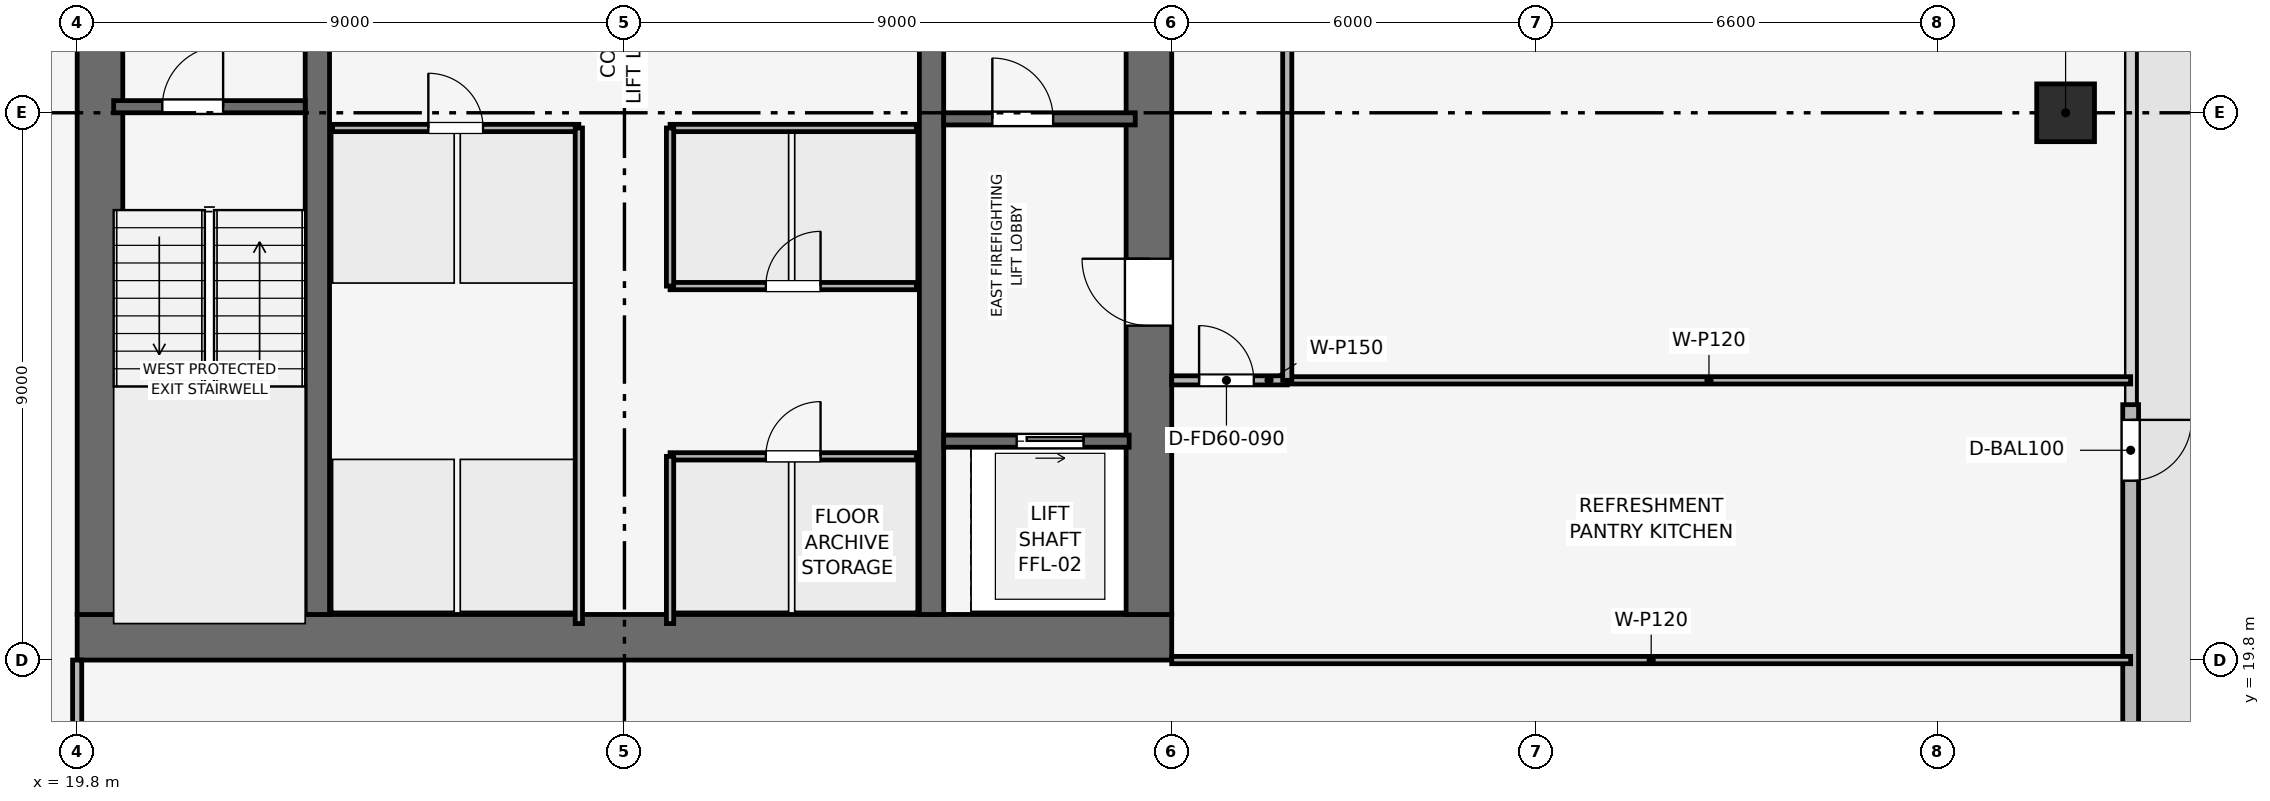
"""IFC4 building model, lengths in metres.
Left out: names, types, materials, properties, quantities, classifications, styles, units other than length and angle.
Written with IfcOpenShell. Run it as: python <this file> out.ifc"""

import sys

from ifc_helpers import new_model, si_unit, direction, frame, frame_2d, origin, origin_2d, place, context, subcontext, project, spatial, rectangle, extrude, element, fill, save


model = new_model("IFC4")
c1 = context("Model", 3, precision=1e-05, world=origin(), true_north=direction((0.0, 1.0)))
c2 = subcontext(c1, "Body", "Model", "MODEL_VIEW")
j1 = project(units=[si_unit("LENGTHUNIT", "METRE"), si_unit("PLANEANGLEUNIT", "RADIAN")], contexts=[c1])
p1 = place(None, origin())
s1 = spatial("IfcSite", under=j1, at=p1, CompositionType="ELEMENT")
p2 = place(p1, origin())
s2 = spatial("IfcBuilding", under=s1, at=p2, CompositionType="ELEMENT")
p3 = place(p2, frame((0.0, 0.0, 276.6)))
s3 = spatial("IfcBuildingStorey", under=s2, at=p3, CompositionType="ELEMENT", Elevation=276.6)
p4 = place(p3, frame((19.8, 20.175, 0.0), z_axis=(0.0, 0.0, 1.0), x_axis=(1.0, 0.0, 0.0)))
e1 = element("IfcWall", 1, at=p4, inside=s3, PredefinedType="SHEAR", context=c2, shape_type="SweptSolid", body=[
    extrude(rectangle(XDim=18.0, YDim=0.75, at=frame_2d((9.0, 0.0))), origin(), (0.0, 0.0, 1.0), 3.75),
])
p5 = place(p3, frame((20.175, 20.55, 0.0), z_axis=(0.0, 0.0, 1.0), x_axis=(0.0, 1.0, 0.0)))
e2 = element("IfcWall", 2, at=p5, inside=s3, PredefinedType="SHEAR", context=c2, shape_type="SweptSolid", body=[
    extrude(rectangle(XDim=16.5, YDim=0.75, at=frame_2d((8.25, 0.0))), origin(), (0.0, 0.0, 1.0), 3.75),
])
p6 = place(p5, frame((10.25, 0.0, 0.0)))
e3 = element("IfcOpeningElement", 3, at=p6, cuts=e2, PredefinedType="OPENING", context=c2, shape_type="SweptSolid", body=[
    extrude(rectangle(XDim=1.1, YDim=2.15, at=frame_2d((0.55, 1.075))), frame((0.0, 0.385, 0.0), z_axis=(0.0, -1.0, 0.0), x_axis=(1.0, 0.0, 0.0)), (0.0, 0.0, 1.0), 0.77),
])
p7 = place(p3, frame((37.425, 20.55, 0.0), z_axis=(0.0, 0.0, 1.0), x_axis=(0.0, 1.0, 0.0)))
e4 = element("IfcWall", 4, at=p7, inside=s3, PredefinedType="SHEAR", context=c2, shape_type="SweptSolid", body=[
    extrude(rectangle(XDim=16.5, YDim=0.75, at=frame_2d((8.25, 0.0))), origin(), (0.0, 0.0, 1.0), 3.75),
])
p8 = place(p7, frame((4.75, 0.0, 0.0)))
e5 = element("IfcOpeningElement", 5, at=p8, cuts=e4, PredefinedType="OPENING", context=c2, shape_type="SweptSolid", body=[
    extrude(rectangle(XDim=1.1, YDim=2.15, at=frame_2d((0.55, 1.075))), frame((0.0, 0.385, 0.0), z_axis=(0.0, -1.0, 0.0), x_axis=(1.0, 0.0, 0.0)), (0.0, 0.0, 1.0), 0.77),
])
for number, where, z_axis, x_axis in (
    (6, (23.75, 20.55, 0.0), (0.0, 0.0, 1.0), (0.0, 1.0, 0.0)),
    (7, (33.85, 20.55, 0.0), (0.0, 0.0, 1.0), (0.0, 1.0, 0.0)),
):
    element("IfcWall", number, at=place(p3, frame(where, z_axis=z_axis, x_axis=x_axis)), inside=s3, PredefinedType="SHEAR", context=c2, shape_type="SweptSolid", body=[
        extrude(rectangle(XDim=16.5, YDim=0.4, at=frame_2d((8.25, 0.0))), origin(), (0.0, 0.0, 1.0), 3.75),
    ])
p9 = place(p3, frame((52.5, 28.8, 0.003), z_axis=(0.0, 0.0, 1.0), x_axis=(1.0, 0.0, 0.0)))
e8 = element("IfcColumn", 8, at=p9, inside=s3, PredefinedType="COLUMN", context=c2, shape_type="SweptSolid", body=[
    extrude(rectangle(XDim=0.95, YDim=0.95, at=origin_2d()), origin(), (0.0, 0.0, 1.0), 3.494),
])
p10 = place(p3, frame((53.57, 24.0, 0.0), z_axis=(0.0, 0.0, 1.0), x_axis=(0.0, -1.0, 0.0)))
e9 = element("IfcWall", 9, at=p10, inside=s3, PredefinedType="SOLIDWALL", context=c2, shape_type="SweptSolid", body=[
    extrude(rectangle(XDim=13.2, YDim=0.26, at=frame_2d((6.6, 0.0))), origin(), (0.0, 0.0, 1.0), 3.5),
])
p11 = place(p10, frame((0.25, 0.0, 0.0)))
e10 = element("IfcOpeningElement", 10, at=p11, cuts=e9, PredefinedType="OPENING", context=c2, shape_type="SweptSolid", body=[
    extrude(rectangle(XDim=1.0, YDim=2.2, at=frame_2d((0.5, 1.1))), frame((0.0, 0.14, 0.0), z_axis=(0.0, -1.0, 0.0), x_axis=(1.0, 0.0, 0.0)), (0.0, 0.0, 1.0), 0.28),
])
p12 = place(p3, frame((20.4, 28.9, 0.0), z_axis=(0.0, 0.0, 1.0), x_axis=(1.0, 0.0, 0.0)))
e11 = element("IfcWall", 11, at=p12, inside=s3, PredefinedType="SHEAR", context=c2, shape_type="SweptSolid", body=[
    extrude(rectangle(XDim=3.15, YDim=0.2, at=frame_2d((1.575, 0.0))), origin(), (0.0, 0.0, 1.0), 3.5),
])
p13 = place(p12, frame((0.8, 0.0, 0.0)))
e12 = element("IfcOpeningElement", 12, at=p13, cuts=e11, PredefinedType="OPENING", context=c2, shape_type="SweptSolid", body=[
    extrude(rectangle(XDim=1.0, YDim=2.1, at=frame_2d((0.5, 1.05))), frame((0.0, 0.11, 0.0), z_axis=(0.0, -1.0, 0.0), x_axis=(1.0, 0.0, 0.0)), (0.0, 0.0, 1.0), 0.22),
])
p14 = place(p3, frame((34.05, 28.7, 0.0), z_axis=(0.0, 0.0, 1.0), x_axis=(1.0, 0.0, 0.0)))
e13 = element("IfcWall", 13, at=p14, inside=s3, PredefinedType="SHEAR", context=c2, shape_type="SweptSolid", body=[
    extrude(rectangle(XDim=3.15, YDim=0.2, at=frame_2d((1.575, 0.0))), origin(), (0.0, 0.0, 1.0), 3.5),
])
p15 = place(p14, frame((0.8, 0.0, 0.0)))
e14 = element("IfcOpeningElement", 14, at=p15, cuts=e13, PredefinedType="OPENING", context=c2, shape_type="SweptSolid", body=[
    extrude(rectangle(XDim=1.0, YDim=2.1, at=frame_2d((0.5, 1.05))), frame((0.0, 0.11, 0.0), z_axis=(0.0, -1.0, 0.0), x_axis=(1.0, 0.0, 0.0)), (0.0, 0.0, 1.0), 0.22),
])
p16 = place(p3, frame((34.05, 23.4, 0.0), z_axis=(0.0, 0.0, 1.0), x_axis=(1.0, 0.0, 0.0)))
e15 = element("IfcWall", 15, at=p16, inside=s3, PredefinedType="SHEAR", context=c2, shape_type="SweptSolid", body=[
    extrude(rectangle(XDim=3.05, YDim=0.2, at=frame_2d((1.525, 0.0))), origin(), (0.0, 0.0, 1.0), 3.5),
])
p17 = place(p16, frame((1.2, 0.0, 0.0)))
e16 = element("IfcOpeningElement", 16, at=p17, cuts=e15, PredefinedType="OPENING", context=c2, shape_type="SweptSolid", body=[
    extrude(rectangle(XDim=1.1, YDim=2.15, at=frame_2d((0.55, 1.075))), frame((0.0, 0.11, 0.0), z_axis=(0.0, -1.0, 0.0), x_axis=(1.0, 0.0, 0.0)), (0.0, 0.0, 1.0), 0.22),
])
p18 = place(p3, frame((24.0, 28.55, 0.0), z_axis=(0.0, 0.0, 1.0), x_axis=(1.0, 0.0, 0.0)))
e17 = element("IfcWall", 17, at=p18, inside=s3, PredefinedType="PARTITIONING", context=c2, shape_type="SweptSolid", body=[
    extrude(rectangle(XDim=4.05, YDim=0.12, at=frame_2d((2.025, 0.0))), origin(), (0.0, 0.0, 1.0), 3.5),
])
p19 = place(p18, frame((1.575, 0.0, 0.0)))
e18 = element("IfcOpeningElement", 18, at=p19, cuts=e17, PredefinedType="OPENING", context=c2, shape_type="SweptSolid", body=[
    extrude(rectangle(XDim=0.9, YDim=2.1, at=frame_2d((0.45, 1.05))), frame((0.0, 0.07, 0.0), z_axis=(0.0, -1.0, 0.0), x_axis=(1.0, 0.0, 0.0)), (0.0, 0.0, 1.0), 0.14),
])
p20 = place(p3, frame((28.05, 20.4, 0.0), z_axis=(0.0, 0.0, 1.0), x_axis=(0.0, 1.0, 0.0)))
e19 = element("IfcWall", 19, at=p20, inside=s3, PredefinedType="PARTITIONING", context=c2, shape_type="SweptSolid", body=[
    extrude(rectangle(XDim=8.15, YDim=0.12, at=frame_2d((4.075, 0.0))), origin(), (0.0, 0.0, 1.0), 3.5),
])
p21 = place(p3, frame((29.55, 23.15, 0.0), z_axis=(0.0, 0.0, 1.0), x_axis=(1.0, 0.0, 0.0)))
e20 = element("IfcWall", 20, at=p21, inside=s3, PredefinedType="PARTITIONING", context=c2, shape_type="SweptSolid", body=[
    extrude(rectangle(XDim=4.05, YDim=0.12, at=frame_2d((2.025, 0.0))), origin(), (0.0, 0.0, 1.0), 3.5),
])
p22 = place(p21, frame((1.575, 0.0, 0.0)))
e21 = element("IfcOpeningElement", 21, at=p22, cuts=e20, PredefinedType="OPENING", context=c2, shape_type="SweptSolid", body=[
    extrude(rectangle(XDim=0.9, YDim=2.1, at=frame_2d((0.45, 1.05))), frame((0.0, 0.07, 0.0), z_axis=(0.0, -1.0, 0.0), x_axis=(1.0, 0.0, 0.0)), (0.0, 0.0, 1.0), 0.14),
])
p23 = place(p3, frame((29.55, 20.4, 0.0), z_axis=(0.0, 0.0, 1.0), x_axis=(0.0, 1.0, 0.0)))
e22 = element("IfcWall", 22, at=p23, inside=s3, PredefinedType="PARTITIONING", context=c2, shape_type="SweptSolid", body=[
    extrude(rectangle(XDim=2.75, YDim=0.12, at=frame_2d((1.375, 0.0))), origin(), (0.0, 0.0, 1.0), 3.5),
])
p24 = place(p3, frame((29.55, 25.95, 0.0), z_axis=(0.0, 0.0, 1.0), x_axis=(1.0, 0.0, 0.0)))
e23 = element("IfcWall", 23, at=p24, inside=s3, PredefinedType="PARTITIONING", context=c2, shape_type="SweptSolid", body=[
    extrude(rectangle(XDim=4.05, YDim=0.12, at=frame_2d((2.025, 0.0))), origin(), (0.0, 0.0, 1.0), 3.5),
])
p25 = place(p24, frame((1.575, 0.0, 0.0)))
e24 = element("IfcOpeningElement", 24, at=p25, cuts=e23, PredefinedType="OPENING", context=c2, shape_type="SweptSolid", body=[
    extrude(rectangle(XDim=0.9, YDim=2.1, at=frame_2d((0.45, 1.05))), frame((0.0, 0.07, 0.0), z_axis=(0.0, -1.0, 0.0), x_axis=(1.0, 0.0, 0.0)), (0.0, 0.0, 1.0), 0.14),
])
p26 = place(p3, frame((29.55, 28.55, 0.0), z_axis=(0.0, 0.0, 1.0), x_axis=(1.0, 0.0, 0.0)))
e25 = element("IfcWall", 25, at=p26, inside=s3, PredefinedType="PARTITIONING", context=c2, shape_type="SweptSolid", body=[
    extrude(rectangle(XDim=4.05, YDim=0.12, at=frame_2d((2.025, 0.0))), origin(), (0.0, 0.0, 1.0), 3.5),
])
p27 = place(p3, frame((29.55, 25.95, 0.0), z_axis=(0.0, 0.0, 1.0), x_axis=(0.0, 1.0, 0.0)))
e26 = element("IfcWall", 26, at=p27, inside=s3, PredefinedType="PARTITIONING", context=c2, shape_type="SweptSolid", body=[
    extrude(rectangle(XDim=2.6, YDim=0.12, at=frame_2d((1.3, 0.0))), origin(), (0.0, 0.0, 1.0), 3.5),
])
p28 = place(p3, frame((19.8, 4.03, 0.0), z_axis=(0.0, 0.0, 1.0), x_axis=(0.0, 1.0, 0.0)))
e27 = element("IfcWall", 27, at=p28, inside=s3, PredefinedType="PARTITIONING", context=c2, shape_type="SweptSolid", body=[
    extrude(rectangle(XDim=15.77, YDim=0.15, at=frame_2d((7.885, 0.0))), origin(), (0.0, 0.0, 1.0), 3.085),
])
p29 = place(p28, frame((10.82, 0.0, 0.0)))
e28 = element("IfcOpeningElement", 28, at=p29, cuts=e27, PredefinedType="OPENING", context=c2, shape_type="SweptSolid", body=[
    extrude(rectangle(XDim=0.9, YDim=2.1, at=frame_2d((0.45, 1.05))), frame((0.0, 0.085, 0.0), z_axis=(0.0, -1.0, 0.0), x_axis=(1.0, 0.0, 0.0)), (0.0, 0.0, 1.0), 0.17),
])
p30 = place(p3, frame((37.8, 19.8, 0.0), z_axis=(0.0, 0.0, 1.0), x_axis=(1.0, 0.0, 0.0)))
e29 = element("IfcWall", 29, at=p30, inside=s3, PredefinedType="PARTITIONING", context=c2, shape_type="SweptSolid", body=[
    extrude(rectangle(XDim=15.77, YDim=0.12, at=frame_2d((7.885, 0.0))), origin(), (0.0, 0.0, 1.0), 3.085),
])
p31 = place(p3, frame((37.8, 24.4, 0.0), z_axis=(0.0, 0.0, 1.0), x_axis=(1.0, 0.0, 0.0)))
e30 = element("IfcWall", 30, at=p31, inside=s3, PredefinedType="PARTITIONING", context=c2, shape_type="SweptSolid", body=[
    extrude(rectangle(XDim=1.9, YDim=0.15, at=frame_2d((0.95, 0.0))), origin(), (0.0, 0.0, 1.0), 3.5),
])
p32 = place(p31, frame((0.45, 0.0, 0.0)))
e31 = element("IfcOpeningElement", 31, at=p32, cuts=e30, PredefinedType="OPENING", context=c2, shape_type="SweptSolid", body=[
    extrude(rectangle(XDim=0.9, YDim=2.1, at=frame_2d((0.45, 1.05))), frame((0.0, 0.085, 0.0), z_axis=(0.0, -1.0, 0.0), x_axis=(1.0, 0.0, 0.0)), (0.0, 0.0, 1.0), 0.17),
])
p33 = place(p3, frame((39.7, 24.4, 0.0), z_axis=(0.0, 0.0, 1.0), x_axis=(1.0, 0.0, 0.0)))
e32 = element("IfcWall", 32, at=p33, inside=s3, PredefinedType="PARTITIONING", context=c2, shape_type="SweptSolid", body=[
    extrude(rectangle(XDim=13.87, YDim=0.12, at=frame_2d((6.935, 0.0))), origin(), (0.0, 0.0, 1.0), 3.085),
])
p34 = place(p3, frame((39.7, 24.4, 0.0), z_axis=(0.0, 0.0, 1.0), x_axis=(0.0, 1.0, 0.0)))
e33 = element("IfcWall", 33, at=p34, inside=s3, PredefinedType="PARTITIONING", context=c2, shape_type="SweptSolid", body=[
    extrude(rectangle(XDim=15.3, YDim=0.15, at=frame_2d((7.65, 0.0))), origin(), (0.0, 0.0, 1.0), 3.085),
])
p35 = place(p34, frame((7.2, 0.0, 0.0)))
e34 = element("IfcOpeningElement", 34, at=p35, cuts=e33, PredefinedType="OPENING", context=c2, shape_type="SweptSolid", body=[
    extrude(rectangle(XDim=0.9, YDim=2.1, at=frame_2d((0.45, 1.05))), frame((0.0, 0.085, 0.0), z_axis=(0.0, -1.0, 0.0), x_axis=(1.0, 0.0, 0.0)), (0.0, 0.0, 1.0), 0.17),
])
p36 = place(p11, origin())
e35 = element("IfcDoor", 35, at=p36, inside=s3, OperationType="SINGLE_SWING_LEFT", PredefinedType="DOOR", context=c2, shape_type="SweptSolid", body=[
    extrude(rectangle(XDim=1.0, YDim=2.2, at=frame_2d((0.5, 1.1))), frame((0.0, 0.025, 0.0), z_axis=(0.0, -1.0, 0.0), x_axis=(1.0, 0.0, 0.0)), (0.0, 0.0, 1.0), 0.05),
])
fill(e10, e35)
p37 = place(p13, origin())
e36 = element("IfcDoor", 36, at=p37, inside=s3, OperationType="SINGLE_SWING_RIGHT", PredefinedType="DOOR", context=c2, shape_type="SweptSolid", body=[
    extrude(rectangle(XDim=1.0, YDim=2.1, at=frame_2d((0.5, 1.05))), frame((0.0, 0.025, 0.0), z_axis=(0.0, -1.0, 0.0), x_axis=(1.0, 0.0, 0.0)), (0.0, 0.0, 1.0), 0.05),
])
fill(e12, e36)
p38 = place(p15, origin())
e37 = element("IfcDoor", 37, at=p38, inside=s3, OperationType="SINGLE_SWING_LEFT", PredefinedType="DOOR", context=c2, shape_type="SweptSolid", body=[
    extrude(rectangle(XDim=1.0, YDim=2.1, at=frame_2d((0.5, 1.05))), frame((0.0, 0.025, 0.0), z_axis=(0.0, -1.0, 0.0), x_axis=(1.0, 0.0, 0.0)), (0.0, 0.0, 1.0), 0.05),
])
fill(e14, e37)
p39 = place(p17, origin())
e38 = element("IfcDoor", 38, at=p39, inside=s3, OperationType="SLIDING_TO_RIGHT", PredefinedType="DOOR", context=c2, shape_type="SweptSolid", body=[
    extrude(rectangle(XDim=1.1, YDim=2.15, at=frame_2d((0.55, 1.075))), frame((0.0, 0.025, 0.0), z_axis=(0.0, -1.0, 0.0), x_axis=(1.0, 0.0, 0.0)), (0.0, 0.0, 1.0), 0.05),
])
fill(e16, e38)
p40 = place(p19, origin())
e39 = element("IfcDoor", 39, at=p40, inside=s3, OperationType="SINGLE_SWING_LEFT", PredefinedType="DOOR", context=c2, shape_type="SweptSolid", body=[
    extrude(rectangle(XDim=0.9, YDim=2.1, at=frame_2d((0.45, 1.05))), frame((0.0, 0.025, 0.0), z_axis=(0.0, -1.0, 0.0), x_axis=(1.0, 0.0, 0.0)), (0.0, 0.0, 1.0), 0.05),
])
fill(e18, e39)
p41 = place(p22, origin())
e40 = element("IfcDoor", 40, at=p41, inside=s3, OperationType="SINGLE_SWING_RIGHT", PredefinedType="DOOR", context=c2, shape_type="SweptSolid", body=[
    extrude(rectangle(XDim=0.9, YDim=2.1, at=frame_2d((0.45, 1.05))), frame((0.0, 0.025, 0.0), z_axis=(0.0, -1.0, 0.0), x_axis=(1.0, 0.0, 0.0)), (0.0, 0.0, 1.0), 0.05),
])
fill(e21, e40)
p42 = place(p25, origin())
e41 = element("IfcDoor", 41, at=p42, inside=s3, OperationType="SINGLE_SWING_RIGHT", PredefinedType="DOOR", context=c2, shape_type="SweptSolid", body=[
    extrude(rectangle(XDim=0.9, YDim=2.1, at=frame_2d((0.45, 1.05))), frame((0.0, 0.025, 0.0), z_axis=(0.0, -1.0, 0.0), x_axis=(1.0, 0.0, 0.0)), (0.0, 0.0, 1.0), 0.05),
])
fill(e24, e41)
p43 = place(p32, origin())
e42 = element("IfcDoor", 42, at=p43, inside=s3, OperationType="SINGLE_SWING_LEFT", PredefinedType="DOOR", context=c2, shape_type="SweptSolid", body=[
    extrude(rectangle(XDim=0.9, YDim=2.1, at=frame_2d((0.45, 1.05))), frame((0.0, 0.025, 0.0), z_axis=(0.0, -1.0, 0.0), x_axis=(1.0, 0.0, 0.0)), (0.0, 0.0, 1.0), 0.05),
])
fill(e31, e42)
p44 = place(p8, origin())
e43 = element("IfcDoor", 43, at=p44, inside=s3, OperationType="SINGLE_SWING_RIGHT", PredefinedType="DOOR", context=c2, shape_type="SweptSolid", body=[
    extrude(rectangle(XDim=1.1, YDim=2.15, at=frame_2d((0.55, 1.075))), frame((0.0, 0.025, 0.0), z_axis=(0.0, -1.0, 0.0), x_axis=(1.0, 0.0, 0.0)), (0.0, 0.0, 1.0), 0.05),
])
fill(e5, e43)
save(model, sys.argv[1])
